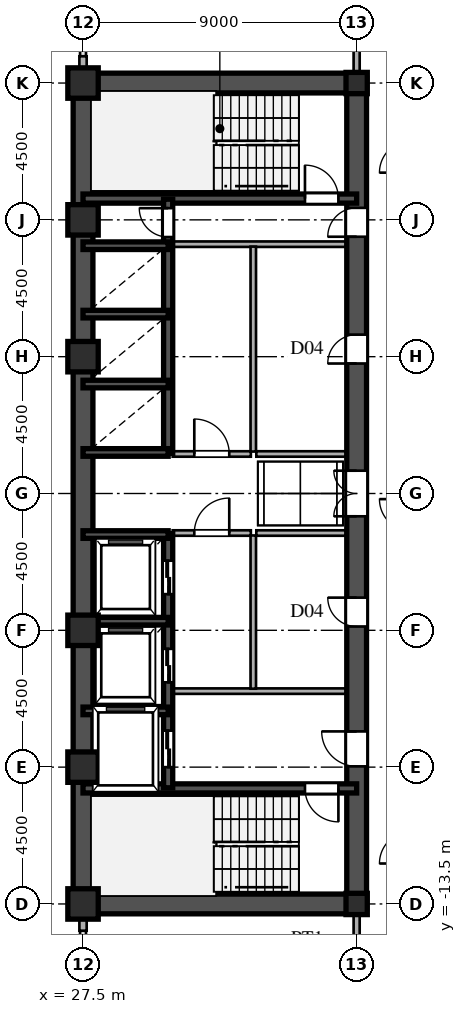
"""IFC4 building model, lengths in metres.
Left out: names, types, materials, properties, quantities, classifications, styles, units other than length and angle.
Written with IfcOpenShell. Run it as: python <this file> out.ifc"""

import sys

from ifc_helpers import new_model, si_unit, direction, frame, frame_2d, origin, origin_2d, place, context, subcontext, project, spatial, rectangle, hollow_rectangle, i_section, extrude, source, transform, mapped, element, fill, save


model = new_model("IFC4")
c1 = context("Model", 3, precision=1e-05, world=origin(), true_north=direction((0.0, 1.0)))
c2 = subcontext(c1, "Body", "Model", "MODEL_VIEW")
j1 = project(units=[si_unit("LENGTHUNIT", "METRE"), si_unit("PLANEANGLEUNIT", "RADIAN")], contexts=[c1])
p1 = place(None, origin())
s1 = spatial("IfcSite", under=j1, at=p1, CompositionType="ELEMENT")
p2 = place(p1, origin())
s2 = spatial("IfcBuilding", under=s1, at=p2, CompositionType="ELEMENT")
p3 = place(p2, frame((0.0, 0.0, 110.4)))
s3 = spatial("IfcBuildingStorey", under=s2, at=p3, CompositionType="ELEMENT", Elevation=110.4)
m1 = source(origin(), c2, "Body", "SweptSolid", [
    extrude(hollow_rectangle(XDim=1.0, YDim=1.0, WallThickness=0.042, at=origin_2d()), origin(), (0.0, 0.0, 1.0), 3.6),
])
for number, where, z_axis, x_axis in (
    (1, (27.5, -13.5, 0.0), (0.0, 0.0, 1.0), (1.0, 0.0, 0.0)),
    (2, (27.5, -9.0, 0.0), (0.0, 0.0, 1.0), (1.0, 0.0, 0.0)),
    (3, (27.5, -4.5, 0.0), (0.0, 0.0, 1.0), (1.0, 0.0, 0.0)),
    (4, (27.5, 4.5, 0.0), (0.0, 0.0, 1.0), (1.0, 0.0, 0.0)),
    (5, (27.5, 9.0, 0.0), (0.0, 0.0, 1.0), (1.0, 0.0, 0.0)),
    (6, (27.5, 13.5, 0.0), (0.0, 0.0, 1.0), (1.0, 0.0, 0.0)),
):
    element("IfcColumn", number, at=place(p3, frame(where, z_axis=z_axis, x_axis=x_axis)), inside=s3, PredefinedType="COLUMN", context=c2, shape_type="MappedRepresentation", body=[
        mapped(m1, transform((0.0, 0.0, 0.0), scale=1.0)),
    ])
m2 = source(origin(), c2, "Body", "SweptSolid", [
    extrude(i_section(OverallWidth=0.7, OverallDepth=0.7, WebThickness=0.028, FlangeThickness=0.045, at=origin_2d()), origin(), (0.0, 0.0, 1.0), 3.6),
])
for number, where, z_axis, x_axis in (
    (7, (36.5, -13.5, 0.0), (0.0, 0.0, 1.0), (1.0, 0.0, 0.0)),
    (8, (36.5, 13.5, 0.0), (0.0, 0.0, 1.0), (1.0, 0.0, 0.0)),
):
    element("IfcColumn", number, at=place(p3, frame(where, z_axis=z_axis, x_axis=x_axis)), inside=s3, PredefinedType="COLUMN", context=c2, shape_type="MappedRepresentation", body=[
        mapped(m2, transform((0.0, 0.0, 0.0), scale=1.0)),
    ])
for number, where, z_axis, x_axis in (
    (9, (27.5, -14.38, 0.0), (0.0, 0.0, 1.0), (0.0, 1.0, 0.0)),
    (10, (27.5, 13.83, 0.0), (0.0, 0.0, 1.0), (0.0, 1.0, 0.0)),
):
    element("IfcWall", number, at=place(p3, frame(where, z_axis=z_axis, x_axis=x_axis)), inside=s3, PredefinedType="SOLIDWALL", context=c2, shape_type="SweptSolid", body=[
        extrude(rectangle(XDim=0.55, YDim=0.24, at=frame_2d((0.275, 0.0))), origin(), (0.0, 0.0, 1.0), 2.88),
    ])
for number, where, z_axis, x_axis in (
    (11, (27.5, -13.5, 0.0), (0.0, 0.0, 1.0), (0.0, 1.0, 0.0)),
    (12, (27.5, 1.3, 0.0), (0.0, 0.0, 1.0), (0.0, 1.0, 0.0)),
):
    element("IfcWall", number, at=place(p3, frame(where, z_axis=z_axis, x_axis=x_axis)), inside=s3, PredefinedType="SHEAR", context=c2, shape_type="SweptSolid", body=[
        extrude(rectangle(XDim=12.2, YDim=0.65, at=frame_2d((6.1, 0.0))), origin(), (0.0, 0.0, 1.0), 3.38),
    ])
p4 = place(p3, frame((27.5, -1.3, 0.0), z_axis=(0.0, 0.0, 1.0), x_axis=(0.0, 1.0, 0.0)))
e13 = element("IfcWall", 13, at=p4, inside=s3, PredefinedType="SHEAR", context=c2, shape_type="SweptSolid", body=[
    extrude(rectangle(XDim=2.6, YDim=0.65, at=frame_2d((1.3, 0.0))), origin(), (0.0, 0.0, 1.0), 3.38),
])
for number, where, z_axis, x_axis in (
    (14, (27.5, -13.5, 0.0), (0.0, 0.0, 1.0), (1.0, 0.0, 0.0)),
    (15, (27.5, 13.5, 0.0), (0.0, 0.0, 1.0), (1.0, 0.0, 0.0)),
):
    element("IfcWall", number, at=place(p3, frame(where, z_axis=z_axis, x_axis=x_axis)), inside=s3, PredefinedType="SHEAR", context=c2, shape_type="SweptSolid", body=[
        extrude(rectangle(XDim=9.0, YDim=0.65, at=frame_2d((4.5, 0.0))), origin(), (0.0, 0.0, 1.0), 3.38),
    ])
p5 = place(p3, frame((36.5, -13.65, 0.0), z_axis=(0.0, 0.0, 1.0), x_axis=(0.0, 1.0, 0.0)))
e16 = element("IfcWall", 16, at=p5, inside=s3, PredefinedType="SHEAR", context=c2, shape_type="SweptSolid", body=[
    extrude(rectangle(XDim=7.15, YDim=0.65, at=frame_2d((3.575, 0.0))), origin(), (0.0, 0.0, 1.0), 3.38),
])
p6 = place(p5, frame((4.675, 0.0, 0.0)))
e17 = element("IfcOpeningElement", 17, at=p6, cuts=e16, PredefinedType="OPENING", context=c2, shape_type="SweptSolid", body=[
    extrude(rectangle(XDim=1.15, YDim=2.2, at=frame_2d((0.575, 1.1))), frame((0.0, 0.335, 0.0), z_axis=(0.0, -1.0, 0.0), x_axis=(1.0, 0.0, 0.0)), (0.0, 0.0, 1.0), 0.67),
])
p7 = place(p3, frame((36.5, -1.3, 0.0), z_axis=(0.0, 0.0, 1.0), x_axis=(0.0, 1.0, 0.0)))
e18 = element("IfcWall", 18, at=p7, inside=s3, PredefinedType="SHEAR", context=c2, shape_type="SweptSolid", body=[
    extrude(rectangle(XDim=2.6, YDim=0.65, at=frame_2d((1.3, 0.0))), origin(), (0.0, 0.0, 1.0), 3.38),
])
p8 = place(p7, frame((0.55, 0.0, 0.0)))
e19 = element("IfcOpeningElement", 19, at=p8, cuts=e18, PredefinedType="OPENING", context=c2, shape_type="SweptSolid", body=[
    extrude(rectangle(XDim=1.5, YDim=2.3, at=frame_2d((0.75, 1.15))), frame((0.0, 0.335, 0.0), z_axis=(0.0, -1.0, 0.0), x_axis=(1.0, 0.0, 0.0)), (0.0, 0.0, 1.0), 0.67),
])
p9 = place(p3, frame((36.5, 8.2, 0.0), z_axis=(0.0, 0.0, 1.0), x_axis=(0.0, 1.0, 0.0)))
e20 = element("IfcWall", 20, at=p9, inside=s3, PredefinedType="SHEAR", context=c2, shape_type="SweptSolid", body=[
    extrude(rectangle(XDim=5.45, YDim=0.65, at=frame_2d((2.725, 0.0))), origin(), (0.0, 0.0, 1.0), 3.38),
])
p10 = place(p9, frame((0.245, 0.0, 0.0)))
e21 = element("IfcOpeningElement", 21, at=p10, cuts=e20, PredefinedType="OPENING", context=c2, shape_type="SweptSolid", body=[
    extrude(rectangle(XDim=0.95, YDim=2.15, at=frame_2d((0.475, 1.075))), frame((0.0, 0.335, 0.0), z_axis=(0.0, -1.0, 0.0), x_axis=(1.0, 0.0, 0.0)), (0.0, 0.0, 1.0), 0.67),
])
p11 = place(p3, frame((36.5, -6.5, 0.0), z_axis=(0.0, 0.0, 1.0), x_axis=(0.0, 1.0, 0.0)))
e22 = element("IfcWall", 22, at=p11, inside=s3, PredefinedType="SHEAR", context=c2, shape_type="SweptSolid", body=[
    extrude(rectangle(XDim=5.2, YDim=0.65, at=frame_2d((2.6, 0.0))), origin(), (0.0, 0.0, 1.0), 3.38),
])
p12 = place(p11, frame((2.125, 0.0, 0.0)))
e23 = element("IfcOpeningElement", 23, at=p12, cuts=e22, PredefinedType="OPENING", context=c2, shape_type="SweptSolid", body=[
    extrude(rectangle(XDim=0.95, YDim=2.15, at=frame_2d((0.475, 1.075))), frame((0.0, 0.335, 0.0), z_axis=(0.0, -1.0, 0.0), x_axis=(1.0, 0.0, 0.0)), (0.0, 0.0, 1.0), 0.67),
])
p13 = place(p3, frame((36.5, 1.3, 0.0), z_axis=(0.0, 0.0, 1.0), x_axis=(0.0, 1.0, 0.0)))
e24 = element("IfcWall", 24, at=p13, inside=s3, PredefinedType="SHEAR", context=c2, shape_type="SweptSolid", body=[
    extrude(rectangle(XDim=6.9, YDim=0.65, at=frame_2d((3.45, 0.0))), origin(), (0.0, 0.0, 1.0), 3.38),
])
p14 = place(p13, frame((2.975, 0.0, 0.0)))
e25 = element("IfcOpeningElement", 25, at=p14, cuts=e24, PredefinedType="OPENING", context=c2, shape_type="SweptSolid", body=[
    extrude(rectangle(XDim=0.95, YDim=2.15, at=frame_2d((0.475, 1.075))), frame((0.0, 0.335, 0.0), z_axis=(0.0, -1.0, 0.0), x_axis=(1.0, 0.0, 0.0)), (0.0, 0.0, 1.0), 0.67),
])
p15 = place(p3, frame((27.5, -9.7, 0.0), z_axis=(0.0, 0.0, 1.0), x_axis=(1.0, 0.0, 0.0)))
e26 = element("IfcWall", 26, at=p15, inside=s3, PredefinedType="SHEAR", context=c2, shape_type="SweptSolid", body=[
    extrude(rectangle(XDim=9.0, YDim=0.3, at=frame_2d((4.5, 0.0))), origin(), (0.0, 0.0, 1.0), 3.38),
])
p16 = place(p15, frame((7.3, 0.0, 0.0)))
e27 = element("IfcOpeningElement", 27, at=p16, cuts=e26, PredefinedType="OPENING", context=c2, shape_type="SweptSolid", body=[
    extrude(rectangle(XDim=1.1, YDim=2.2, at=frame_2d((0.55, 1.1))), frame((0.0, 0.16, 0.0), z_axis=(0.0, -1.0, 0.0), x_axis=(1.0, 0.0, 0.0)), (0.0, 0.0, 1.0), 0.32),
])
p17 = place(p3, frame((27.5, 9.7, 0.0), z_axis=(0.0, 0.0, 1.0), x_axis=(1.0, 0.0, 0.0)))
e28 = element("IfcWall", 28, at=p17, inside=s3, PredefinedType="SHEAR", context=c2, shape_type="SweptSolid", body=[
    extrude(rectangle(XDim=9.0, YDim=0.3, at=frame_2d((4.5, 0.0))), origin(), (0.0, 0.0, 1.0), 3.38),
])
p18 = place(p17, frame((7.3, 0.0, 0.0)))
e29 = element("IfcOpeningElement", 29, at=p18, cuts=e28, PredefinedType="OPENING", context=c2, shape_type="SweptSolid", body=[
    extrude(rectangle(XDim=1.1, YDim=2.2, at=frame_2d((0.55, 1.1))), frame((0.0, 0.16, 0.0), z_axis=(0.0, -1.0, 0.0), x_axis=(1.0, 0.0, 0.0)), (0.0, 0.0, 1.0), 0.32),
])
for number, where, z_axis, x_axis in (
    (30, (27.5, -7.15, 0.0), (0.0, 0.0, 1.0), (1.0, 0.0, 0.0)),
    (31, (27.5, -4.2, 0.0), (0.0, 0.0, 1.0), (1.0, 0.0, 0.0)),
    (32, (27.5, -1.35, 0.0), (0.0, 0.0, 1.0), (1.0, 0.0, 0.0)),
    (33, (27.5, 1.35, 0.0), (0.0, 0.0, 1.0), (1.0, 0.0, 0.0)),
    (34, (27.5, 3.6, 0.0), (0.0, 0.0, 1.0), (1.0, 0.0, 0.0)),
    (35, (27.5, 5.9, 0.0), (0.0, 0.0, 1.0), (1.0, 0.0, 0.0)),
    (36, (27.5, 8.15, 0.0), (0.0, 0.0, 1.0), (1.0, 0.0, 0.0)),
):
    element("IfcWall", number, at=place(p3, frame(where, z_axis=z_axis, x_axis=x_axis)), inside=s3, PredefinedType="SHEAR", context=c2, shape_type="SweptSolid", body=[
        extrude(rectangle(XDim=2.8, YDim=0.25, at=frame_2d((1.4, 0.0))), origin(), (0.0, 0.0, 1.0), 3.38),
    ])
p19 = place(p3, frame((30.3, -9.68, 0.0), z_axis=(0.0, 0.0, 1.0), x_axis=(0.0, 1.0, 0.0)))
e37 = element("IfcWall", 37, at=p19, inside=s3, PredefinedType="SHEAR", context=c2, shape_type="SweptSolid", body=[
    extrude(rectangle(XDim=2.56, YDim=0.3, at=frame_2d((1.28, 0.0))), origin(), (0.0, 0.0, 1.0), 3.38),
])
p20 = place(p19, frame((0.68, 0.0, 0.0)))
e38 = element("IfcOpeningElement", 38, at=p20, cuts=e37, PredefinedType="OPENING", context=c2, shape_type="SweptSolid", body=[
    extrude(rectangle(XDim=1.2, YDim=2.25, at=frame_2d((0.6, 1.125))), frame((0.0, 0.16, 0.0), z_axis=(0.0, -1.0, 0.0), x_axis=(1.0, 0.0, 0.0)), (0.0, 0.0, 1.0), 0.32),
])
p21 = place(p3, frame((30.3, -7.12, 0.0), z_axis=(0.0, 0.0, 1.0), x_axis=(0.0, 1.0, 0.0)))
e39 = element("IfcWall", 39, at=p21, inside=s3, PredefinedType="SHEAR", context=c2, shape_type="SweptSolid", body=[
    extrude(rectangle(XDim=2.92, YDim=0.3, at=frame_2d((1.46, 0.0))), origin(), (0.0, 0.0, 1.0), 3.38),
])
p22 = place(p21, frame((0.91, 0.0, 0.0)))
e40 = element("IfcOpeningElement", 40, at=p22, cuts=e39, PredefinedType="OPENING", context=c2, shape_type="SweptSolid", body=[
    extrude(rectangle(XDim=1.1, YDim=2.2, at=frame_2d((0.55, 1.1))), frame((0.0, 0.16, 0.0), z_axis=(0.0, -1.0, 0.0), x_axis=(1.0, 0.0, 0.0)), (0.0, 0.0, 1.0), 0.32),
])
p23 = place(p3, frame((30.3, -4.2, 0.0), z_axis=(0.0, 0.0, 1.0), x_axis=(0.0, 1.0, 0.0)))
e41 = element("IfcWall", 41, at=p23, inside=s3, PredefinedType="SHEAR", context=c2, shape_type="SweptSolid", body=[
    extrude(rectangle(XDim=2.88, YDim=0.3, at=frame_2d((1.44, 0.0))), origin(), (0.0, 0.0, 1.0), 3.38),
])
p24 = place(p23, frame((0.89, 0.0, 0.0)))
e42 = element("IfcOpeningElement", 42, at=p24, cuts=e41, PredefinedType="OPENING", context=c2, shape_type="SweptSolid", body=[
    extrude(rectangle(XDim=1.1, YDim=2.2, at=frame_2d((0.55, 1.1))), frame((0.0, 0.16, 0.0), z_axis=(0.0, -1.0, 0.0), x_axis=(1.0, 0.0, 0.0)), (0.0, 0.0, 1.0), 0.32),
])
p25 = place(p3, frame((30.3, 1.32, 0.0), z_axis=(0.0, 0.0, 1.0), x_axis=(0.0, 1.0, 0.0)))
e43 = element("IfcWall", 43, at=p25, inside=s3, PredefinedType="SHEAR", context=c2, shape_type="SweptSolid", body=[
    extrude(rectangle(XDim=2.28, YDim=0.3, at=frame_2d((1.14, 0.0))), origin(), (0.0, 0.0, 1.0), 3.38),
])
p26 = place(p3, frame((30.3, 3.6, 0.0), z_axis=(0.0, 0.0, 1.0), x_axis=(0.0, 1.0, 0.0)))
e44 = element("IfcWall", 44, at=p26, inside=s3, PredefinedType="SHEAR", context=c2, shape_type="SweptSolid", body=[
    extrude(rectangle(XDim=2.3, YDim=0.3, at=frame_2d((1.15, 0.0))), origin(), (0.0, 0.0, 1.0), 3.38),
])
p27 = place(p3, frame((30.3, 5.9, 0.0), z_axis=(0.0, 0.0, 1.0), x_axis=(0.0, 1.0, 0.0)))
e45 = element("IfcWall", 45, at=p27, inside=s3, PredefinedType="SHEAR", context=c2, shape_type="SweptSolid", body=[
    extrude(rectangle(XDim=2.25, YDim=0.3, at=frame_2d((1.125, 0.0))), origin(), (0.0, 0.0, 1.0), 3.38),
])
p28 = place(p3, frame((30.3, 8.15, 0.0), z_axis=(0.0, 0.0, 1.0), x_axis=(0.0, 1.0, 0.0)))
e46 = element("IfcWall", 46, at=p28, inside=s3, PredefinedType="SHEAR", context=c2, shape_type="SweptSolid", body=[
    extrude(rectangle(XDim=1.53, YDim=0.3, at=frame_2d((0.765, 0.0))), origin(), (0.0, 0.0, 1.0), 3.38),
])
p29 = place(p28, frame((0.285, 0.0, 0.0)))
e47 = element("IfcOpeningElement", 47, at=p29, cuts=e46, PredefinedType="OPENING", context=c2, shape_type="SweptSolid", body=[
    extrude(rectangle(XDim=0.95, YDim=2.15, at=frame_2d((0.475, 1.075))), frame((0.0, 0.16, 0.0), z_axis=(0.0, -1.0, 0.0), x_axis=(1.0, 0.0, 0.0)), (0.0, 0.0, 1.0), 0.32),
])
for number, where, z_axis, x_axis in (
    (48, (30.45, -6.5, 0.0), (0.0, 0.0, 1.0), (1.0, 0.0, 0.0)),
    (49, (30.45, 8.2, 0.0), (0.0, 0.0, 1.0), (1.0, 0.0, 0.0)),
):
    element("IfcWall", number, at=place(p3, frame(where, z_axis=z_axis, x_axis=x_axis)), inside=s3, PredefinedType="PARTITIONING", context=c2, shape_type="SweptSolid", body=[
        extrude(rectangle(XDim=5.7, YDim=0.18, at=frame_2d((2.85, 0.0))), origin(), (0.0, 0.0, 1.0), 3.38),
    ])
p30 = place(p3, frame((33.1, -6.42, 0.0), z_axis=(0.0, 0.0, 1.0), x_axis=(0.0, 1.0, 0.0)))
e50 = element("IfcWall", 50, at=p30, inside=s3, PredefinedType="PARTITIONING", context=c2, shape_type="SweptSolid", body=[
    extrude(rectangle(XDim=5.04, YDim=0.18, at=frame_2d((2.52, 0.0))), origin(), (0.0, 0.0, 1.0), 3.38),
])
p31 = place(p3, frame((33.1, 1.38, 0.0), z_axis=(0.0, 0.0, 1.0), x_axis=(0.0, 1.0, 0.0)))
e51 = element("IfcWall", 51, at=p31, inside=s3, PredefinedType="PARTITIONING", context=c2, shape_type="SweptSolid", body=[
    extrude(rectangle(XDim=6.74, YDim=0.18, at=frame_2d((3.37, 0.0))), origin(), (0.0, 0.0, 1.0), 3.38),
])
p32 = place(p3, frame((30.45, -1.3, 0.0), z_axis=(0.0, 0.0, 1.0), x_axis=(1.0, 0.0, 0.0)))
e52 = element("IfcWall", 52, at=p32, inside=s3, PredefinedType="PARTITIONING", context=c2, shape_type="SweptSolid", body=[
    extrude(rectangle(XDim=2.57, YDim=0.18, at=frame_2d((1.285, 0.0))), origin(), (0.0, 0.0, 1.0), 3.38),
])
p33 = place(p32, frame((0.71, 0.0, 0.0)))
e53 = element("IfcOpeningElement", 53, at=p33, cuts=e52, PredefinedType="OPENING", context=c2, shape_type="SweptSolid", body=[
    extrude(rectangle(XDim=1.15, YDim=2.2, at=frame_2d((0.575, 1.1))), frame((0.0, 0.1, 0.0), z_axis=(0.0, -1.0, 0.0), x_axis=(1.0, 0.0, 0.0)), (0.0, 0.0, 1.0), 0.2),
])
p34 = place(p3, frame((30.45, 1.3, 0.0), z_axis=(0.0, 0.0, 1.0), x_axis=(1.0, 0.0, 0.0)))
e54 = element("IfcWall", 54, at=p34, inside=s3, PredefinedType="PARTITIONING", context=c2, shape_type="SweptSolid", body=[
    extrude(rectangle(XDim=2.57, YDim=0.18, at=frame_2d((1.285, 0.0))), origin(), (0.0, 0.0, 1.0), 3.38),
])
p35 = place(p34, frame((0.71, 0.0, 0.0)))
e55 = element("IfcOpeningElement", 55, at=p35, cuts=e54, PredefinedType="OPENING", context=c2, shape_type="SweptSolid", body=[
    extrude(rectangle(XDim=1.15, YDim=2.2, at=frame_2d((0.575, 1.1))), frame((0.0, 0.1, 0.0), z_axis=(0.0, -1.0, 0.0), x_axis=(1.0, 0.0, 0.0)), (0.0, 0.0, 1.0), 0.2),
])
for number, where, z_axis, x_axis in (
    (56, (33.2, -1.3, 0.0), (0.0, 0.0, 1.0), (1.0, 0.0, 0.0)),
    (57, (33.2, 1.3, 0.0), (0.0, 0.0, 1.0), (1.0, 0.0, 0.0)),
):
    element("IfcWall", number, at=place(p3, frame(where, z_axis=z_axis, x_axis=x_axis)), inside=s3, PredefinedType="PARTITIONING", context=c2, shape_type="SweptSolid", body=[
        extrude(rectangle(XDim=2.95, YDim=0.18, at=frame_2d((1.475, 0.0))), origin(), (0.0, 0.0, 1.0), 3.38),
    ])
for number, where, z_axis, x_axis in (
    (58, (36.5, -15.515, 0.0), (0.0, 0.0, 1.0), (0.0, 1.0, 0.0)),
    (59, (36.5, 13.83, 0.0), (0.0, 0.0, 1.0), (0.0, 1.0, 0.0)),
):
    element("IfcWall", number, at=place(p3, frame(where, z_axis=z_axis, x_axis=x_axis)), inside=s3, PredefinedType="PARTITIONING", context=c2, shape_type="SweptSolid", body=[
        extrude(rectangle(XDim=1.685, YDim=0.2, at=frame_2d((0.842, 0.0))), origin(), (0.0, 0.0, 1.0), 2.78),
    ])
m3 = source(origin(), c2, "Body", "SweptSolid", [
    extrude(rectangle(XDim=1.15, YDim=2.2, at=frame_2d((0.575, 1.1))), frame((0.0, 0.025, 0.0), z_axis=(0.0, -1.0, 0.0), x_axis=(1.0, 0.0, 0.0)), (0.0, 0.0, 1.0), 0.05),
])
p36 = place(p6, origin())
e60 = element("IfcDoor", 60, at=p36, inside=s3, OperationType="SINGLE_SWING_RIGHT", PredefinedType="DOOR", context=c2, shape_type="MappedRepresentation", body=[
    mapped(m3, transform((0.0, 0.0, 0.0), scale=1.0)),
])
fill(e17, e60)
m4 = source(origin(), c2, "Body", "SweptSolid", [
    extrude(rectangle(XDim=1.5, YDim=2.3, at=frame_2d((0.75, 1.15))), frame((0.0, 0.025, 0.0), z_axis=(0.0, -1.0, 0.0), x_axis=(1.0, 0.0, 0.0)), (0.0, 0.0, 1.0), 0.05),
])
p37 = place(p8, origin())
e61 = element("IfcDoor", 61, at=p37, inside=s3, OperationType="DOUBLE_SWING_LEFT", PredefinedType="DOOR", context=c2, shape_type="MappedRepresentation", body=[
    mapped(m4, transform((0.0, 0.0, 0.0), scale=1.0)),
])
fill(e19, e61)
m5 = source(origin(), c2, "Body", "SweptSolid", [
    extrude(rectangle(XDim=0.95, YDim=2.15, at=frame_2d((0.475, 1.075))), frame((0.0, 0.025, 0.0), z_axis=(0.0, -1.0, 0.0), x_axis=(1.0, 0.0, 0.0)), (0.0, 0.0, 1.0), 0.05),
])
p38 = place(p10, origin())
e62 = element("IfcDoor", 62, at=p38, inside=s3, OperationType="SINGLE_SWING_LEFT", PredefinedType="DOOR", context=c2, shape_type="MappedRepresentation", body=[
    mapped(m5, transform((0.0, 0.0, 0.0), scale=1.0)),
])
fill(e21, e62)
p39 = place(p12, origin())
e63 = element("IfcDoor", 63, at=p39, inside=s3, OperationType="SINGLE_SWING_RIGHT", PredefinedType="DOOR", context=c2, shape_type="MappedRepresentation", body=[
    mapped(m5, transform((0.0, 0.0, 0.0), scale=1.0)),
])
fill(e23, e63)
p40 = place(p14, origin())
e64 = element("IfcDoor", 64, at=p40, inside=s3, OperationType="SINGLE_SWING_LEFT", PredefinedType="DOOR", context=c2, shape_type="MappedRepresentation", body=[
    mapped(m5, transform((0.0, 0.0, 0.0), scale=1.0)),
])
fill(e25, e64)
m6 = source(origin(), c2, "Body", "SweptSolid", [
    extrude(rectangle(XDim=1.1, YDim=2.2, at=frame_2d((0.55, 1.1))), frame((0.0, 0.025, 0.0), z_axis=(0.0, -1.0, 0.0), x_axis=(1.0, 0.0, 0.0)), (0.0, 0.0, 1.0), 0.05),
])
p41 = place(p16, frame((1.1, 0.0, 0.0), z_axis=(0.0, 0.0, 1.0), x_axis=(-1.0, 0.0, 0.0)))
e65 = element("IfcDoor", 65, at=p41, inside=s3, OperationType="SINGLE_SWING_RIGHT", PredefinedType="DOOR", context=c2, shape_type="MappedRepresentation", body=[
    mapped(m6, transform((0.0, 0.0, 0.0), scale=1.0)),
])
fill(e27, e65)
p42 = place(p18, origin())
e66 = element("IfcDoor", 66, at=p42, inside=s3, OperationType="SINGLE_SWING_LEFT", PredefinedType="DOOR", context=c2, shape_type="MappedRepresentation", body=[
    mapped(m6, transform((0.0, 0.0, 0.0), scale=1.0)),
])
fill(e29, e66)
m7 = source(origin(), c2, "Body", "SweptSolid", [
    extrude(rectangle(XDim=1.2, YDim=2.25, at=frame_2d((0.6, 1.125))), frame((0.0, 0.025, 0.0), z_axis=(0.0, -1.0, 0.0), x_axis=(1.0, 0.0, 0.0)), (0.0, 0.0, 1.0), 0.05),
])
p43 = place(p20, origin())
e67 = element("IfcDoor", 67, at=p43, inside=s3, OperationType="DOUBLE_DOOR_SLIDING", PredefinedType="DOOR", context=c2, shape_type="MappedRepresentation", body=[
    mapped(m7, transform((0.0, 0.0, 0.0), scale=1.0)),
])
fill(e38, e67)
m8 = source(origin(), c2, "Body", "SweptSolid", [
    extrude(rectangle(XDim=1.1, YDim=2.2, at=frame_2d((0.55, 1.1))), frame((0.0, 0.025, 0.0), z_axis=(0.0, -1.0, 0.0), x_axis=(1.0, 0.0, 0.0)), (0.0, 0.0, 1.0), 0.05),
])
p44 = place(p22, origin())
e68 = element("IfcDoor", 68, at=p44, inside=s3, OperationType="DOUBLE_DOOR_SLIDING", PredefinedType="DOOR", context=c2, shape_type="MappedRepresentation", body=[
    mapped(m8, transform((0.0, 0.0, 0.0), scale=1.0)),
])
fill(e40, e68)
p45 = place(p24, origin())
e69 = element("IfcDoor", 69, at=p45, inside=s3, OperationType="DOUBLE_DOOR_SLIDING", PredefinedType="DOOR", context=c2, shape_type="MappedRepresentation", body=[
    mapped(m8, transform((0.0, 0.0, 0.0), scale=1.0)),
])
fill(e42, e69)
p46 = place(p29, origin())
e70 = element("IfcDoor", 70, at=p46, inside=s3, OperationType="SINGLE_SWING_RIGHT", PredefinedType="DOOR", context=c2, shape_type="MappedRepresentation", body=[
    mapped(m5, transform((0.0, 0.0, 0.0), scale=1.0)),
])
fill(e47, e70)
p47 = place(p33, origin())
e71 = element("IfcDoor", 71, at=p47, inside=s3, OperationType="SINGLE_SWING_RIGHT", PredefinedType="DOOR", context=c2, shape_type="MappedRepresentation", body=[
    mapped(m3, transform((0.0, 0.0, 0.0), scale=1.0)),
])
fill(e53, e71)
p48 = place(p35, origin())
e72 = element("IfcDoor", 72, at=p48, inside=s3, OperationType="SINGLE_SWING_LEFT", PredefinedType="DOOR", context=c2, shape_type="MappedRepresentation", body=[
    mapped(m3, transform((0.0, 0.0, 0.0), scale=1.0)),
])
fill(e55, e72)
save(model, sys.argv[1])
